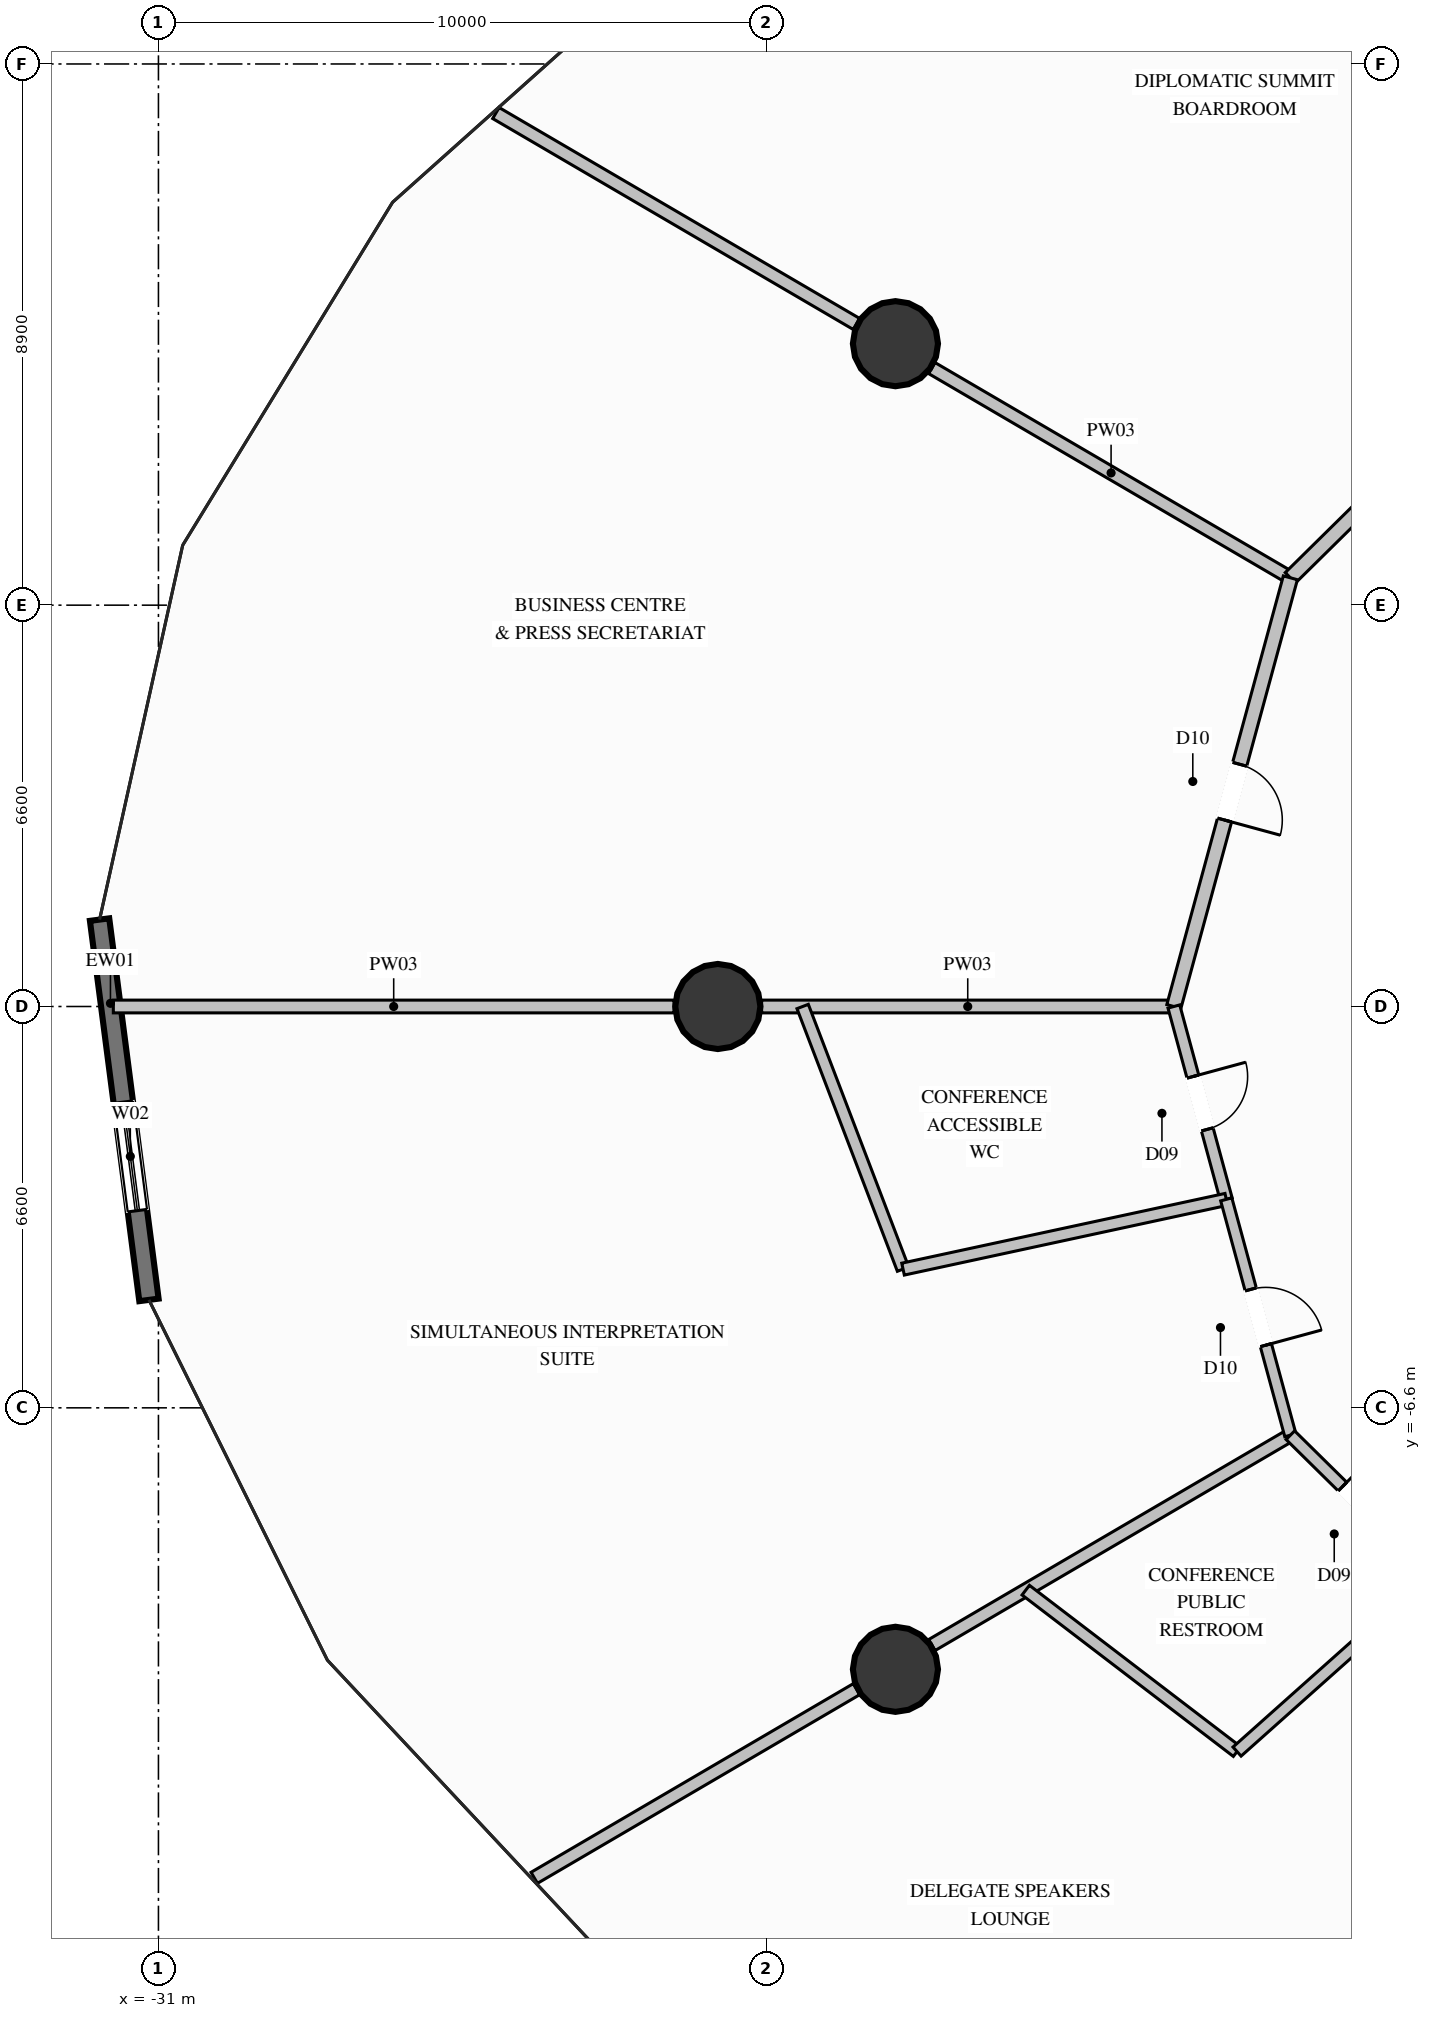
"""IFC4 building model, lengths in metres.
Left out: names, types, materials, properties, quantities, classifications, styles, units other than length and angle.
Written with IfcOpenShell. Run it as: python <this file> out.ifc"""

import sys

from ifc_helpers import new_model, si_unit, direction, frame, frame_2d, origin, origin_2d, place, context, subcontext, project, spatial, rectangle, circle, extrude, element, fill, save


model = new_model("IFC4")
c1 = context("Model", 3, precision=1e-05, world=origin(), true_north=direction((0.0, 1.0)))
c2 = subcontext(c1, "Body", "Model", "MODEL_VIEW")
j1 = project(units=[si_unit("LENGTHUNIT", "METRE"), si_unit("PLANEANGLEUNIT", "RADIAN")], contexts=[c1])
p1 = place(None, origin())
s1 = spatial("IfcSite", under=j1, at=p1, CompositionType="ELEMENT")
p2 = place(p1, origin())
s2 = spatial("IfcBuilding", under=s1, at=p2, CompositionType="ELEMENT")
p3 = place(p2, frame((0.0, 0.0, 18.6)))
s3 = spatial("IfcBuildingStorey", under=s2, at=p3, CompositionType="ELEMENT", Elevation=18.6)
for number, where, z_axis, x_axis in (
    (1, (-18.879, 10.9, 0.0), (0.0, 0.0, 1.0), (1.0, 0.0, 0.0)),
    (2, (-21.8, 0.0, 0.0), (0.0, 0.0, 1.0), (1.0, 0.0, 0.0)),
    (3, (-18.879, -10.9, 0.0), (0.0, 0.0, 1.0), (1.0, 0.0, 0.0)),
):
    element("IfcColumn", number, at=place(p3, frame(where, z_axis=z_axis, x_axis=x_axis)), inside=s3, PredefinedType="COLUMN", context=c2, shape_type="SweptSolid", body=[
        extrude(circle(Radius=0.7, at=origin_2d()), origin(), (0.0, 0.0, 1.0), 5.0),
    ])
p4 = place(p3, frame((-31.156, -4.825, 0.0), z_axis=(0.0, 0.0, 1.0), x_axis=(-0.128759904048, 0.99167579738, 0.0)))
e4 = element("IfcWall", 4, at=p4, inside=s3, PredefinedType="SOLIDWALL", context=c2, shape_type="SweptSolid", body=[
    extrude(rectangle(XDim=6.306, YDim=0.32, at=frame_2d((3.153, 0.0))), origin(), (0.0, 0.0, 1.0), 4.64),
])
p5 = place(p4, frame((1.48, 0.0, 0.65)))
e5 = element("IfcOpeningElement", 5, at=p5, cuts=e4, PredefinedType="OPENING", context=c2, shape_type="SweptSolid", body=[
    extrude(rectangle(XDim=1.8, YDim=2.6, at=frame_2d((0.9, 1.3))), frame((0.0, 0.17, 0.0), z_axis=(0.0, -1.0, 0.0), x_axis=(1.0, 0.0, 0.0)), (0.0, 0.0, 1.0), 0.34),
])
p6 = place(p3, frame((-12.384, 7.05, 0.0), z_axis=(0.0, 0.0, 1.0), x_axis=(-0.863200238908, 0.504861711313, 0.0)))
e6 = element("IfcWall", 6, at=p6, inside=s3, PredefinedType="PARTITIONING", context=c2, shape_type="SweptSolid", body=[
    extrude(rectangle(XDim=6.832, YDim=0.21, at=frame_2d((3.416, 0.0))), origin(), (0.0, 0.0, 1.0), 3.929),
])
p7 = place(p3, frame((-19.521, 11.225, 0.0), z_axis=(0.0, 0.0, 1.0), x_axis=(-0.863178834924, 0.504898305542, 0.0)))
e7 = element("IfcWall", 7, at=p7, inside=s3, PredefinedType="PARTITIONING", context=c2, shape_type="SweptSolid", body=[
    extrude(rectangle(XDim=6.869, YDim=0.21, at=frame_2d((3.434, 0.0))), origin(), (0.0, 0.0, 1.0), 4.64),
])
p8 = place(p3, frame((-14.3, 0.0, 0.0), z_axis=(0.0, 0.0, 1.0), x_axis=(-1.0, 0.0, 0.0)))
e8 = element("IfcWall", 8, at=p8, inside=s3, PredefinedType="PARTITIONING", context=c2, shape_type="SweptSolid", body=[
    extrude(rectangle(XDim=6.78, YDim=0.21, at=frame_2d((3.39, 0.0))), origin(), (0.0, 0.0, 1.0), 3.929),
])
p9 = place(p3, frame((-22.52, 0.0, 0.0), z_axis=(0.0, 0.0, 1.0), x_axis=(-1.0, 0.0, 0.0)))
e9 = element("IfcWall", 9, at=p9, inside=s3, PredefinedType="PARTITIONING", context=c2, shape_type="SweptSolid", body=[
    extrude(rectangle(XDim=9.222, YDim=0.21, at=frame_2d((4.611, 0.0))), origin(), (0.0, 0.0, 1.0), 4.64),
])
p10 = place(p3, frame((-12.384, -7.05, 0.0), z_axis=(0.0, 0.0, 1.0), x_axis=(-0.863039168853, -0.505137004213, 0.0)))
e10 = element("IfcWall", 10, at=p10, inside=s3, PredefinedType="PARTITIONING", context=c2, shape_type="SweptSolid", body=[
    extrude(rectangle(XDim=6.832, YDim=0.21, at=frame_2d((3.416, 0.0))), origin(), (0.0, 0.0, 1.0), 3.929),
])
p11 = place(p3, frame((-19.52, -11.227, 0.0), z_axis=(0.0, 0.0, 1.0), x_axis=(-0.863003476407, -0.505197980706, 0.0)))
e11 = element("IfcWall", 11, at=p11, inside=s3, PredefinedType="PARTITIONING", context=c2, shape_type="SweptSolid", body=[
    extrude(rectangle(XDim=6.14, YDim=0.21, at=frame_2d((3.07, 0.0))), origin(), (0.0, 0.0, 1.0), 4.64),
])
p12 = place(p3, frame((-7.15, 12.211, 0.0), z_axis=(0.0, 0.0, 1.0), x_axis=(-0.712071304345, -0.702107155303, 0.0)))
e12 = element("IfcWall", 12, at=p12, inside=s3, PredefinedType="PARTITIONING", context=c2, shape_type="SweptSolid", body=[
    extrude(rectangle(XDim=7.351, YDim=0.24, at=frame_2d((3.675, 0.0))), origin(), (0.0, 0.0, 1.0), 4.64),
])
p13 = place(p3, frame((-12.384, 7.05, 0.0), z_axis=(0.0, 0.0, 1.0), x_axis=(-0.262260528785, -0.964997106235, 0.0)))
e13 = element("IfcWall", 13, at=p13, inside=s3, PredefinedType="PARTITIONING", context=c2, shape_type="SweptSolid", body=[
    extrude(rectangle(XDim=7.306, YDim=0.24, at=frame_2d((3.653, 0.0))), origin(), (0.0, 0.0, 1.0), 4.64),
])
p14 = place(p13, frame((3.178, 0.0, 0.0)))
e14 = element("IfcOpeningElement", 14, at=p14, cuts=e13, PredefinedType="OPENING", context=c2, shape_type="SweptSolid", body=[
    extrude(rectangle(XDim=0.95, YDim=2.1, at=frame_2d((0.475, 1.05))), frame((0.0, 0.13, 0.0), z_axis=(0.0, -1.0, 0.0), x_axis=(1.0, 0.0, 0.0)), (0.0, 0.0, 1.0), 0.26),
])
p15 = place(p3, frame((-14.3, 0.0, 0.0), z_axis=(0.0, 0.0, 1.0), x_axis=(0.262250045558, -0.964999955236, 0.0)))
e15 = element("IfcWall", 15, at=p15, inside=s3, PredefinedType="PLUMBINGWALL", context=c2, shape_type="SweptSolid", body=[
    extrude(rectangle(XDim=3.287, YDim=0.2, at=frame_2d((1.644, 0.0))), origin(), (0.0, 0.0, 1.0), 4.64),
])
p16 = place(p15, frame((1.194, 0.0, 0.0)))
e16 = element("IfcOpeningElement", 16, at=p16, cuts=e15, PredefinedType="OPENING", context=c2, shape_type="SweptSolid", body=[
    extrude(rectangle(XDim=0.9, YDim=2.1, at=frame_2d((0.45, 1.05))), frame((0.0, 0.11, 0.0), z_axis=(0.0, -1.0, 0.0), x_axis=(1.0, 0.0, 0.0)), (0.0, 0.0, 1.0), 0.22),
])
p17 = place(p3, frame((-20.405, 0.0, 0.0), z_axis=(0.0, 0.0, 1.0), x_axis=(0.357081916748, -0.93407307248, 0.0)))
e17 = element("IfcWall", 17, at=p17, inside=s3, PredefinedType="PLUMBINGWALL", context=c2, shape_type="SweptSolid", body=[
    extrude(rectangle(XDim=4.624, YDim=0.2, at=frame_2d((2.312, 0.0))), origin(), (0.0, 0.0, 1.0), 4.64),
])
p18 = place(p3, frame((-13.438, -3.172, 0.0), z_axis=(0.0, 0.0, 1.0), x_axis=(-0.97750580223, -0.210908526632, 0.0)))
e18 = element("IfcWall", 18, at=p18, inside=s3, PredefinedType="PLUMBINGWALL", context=c2, shape_type="SweptSolid", body=[
    extrude(rectangle(XDim=5.438, YDim=0.2, at=frame_2d((2.719, 0.0))), origin(), (0.0, 0.0, 1.0), 4.64),
])
p19 = place(p3, frame((-13.438, -3.172, 0.0), z_axis=(0.0, 0.0, 1.0), x_axis=(0.262269103922, -0.9649947757, 0.0)))
e19 = element("IfcWall", 19, at=p19, inside=s3, PredefinedType="PARTITIONING", context=c2, shape_type="SweptSolid", body=[
    extrude(rectangle(XDim=4.019, YDim=0.19, at=frame_2d((2.009, 0.0))), origin(), (0.0, 0.0, 1.0), 4.64),
])
p20 = place(p19, frame((1.534, 0.0, 0.0)))
e20 = element("IfcOpeningElement", 20, at=p20, cuts=e19, PredefinedType="OPENING", context=c2, shape_type="SweptSolid", body=[
    extrude(rectangle(XDim=0.95, YDim=2.1, at=frame_2d((0.475, 1.05))), frame((0.0, 0.105, 0.0), z_axis=(0.0, -1.0, 0.0), x_axis=(1.0, 0.0, 0.0)), (0.0, 0.0, 1.0), 0.21),
])
p21 = place(p3, frame((-12.384, -7.05, 0.0), z_axis=(0.0, 0.0, 1.0), x_axis=(0.712072104827, -0.70210634346, 0.0)))
e21 = element("IfcWall", 21, at=p21, inside=s3, PredefinedType="PLUMBINGWALL", context=c2, shape_type="SweptSolid", body=[
    extrude(rectangle(XDim=3.307, YDim=0.2, at=frame_2d((1.654, 0.0))), origin(), (0.0, 0.0, 1.0), 4.64),
])
p22 = place(p21, frame((1.204, 0.0, 0.0)))
e22 = element("IfcOpeningElement", 22, at=p22, cuts=e21, PredefinedType="OPENING", context=c2, shape_type="SweptSolid", body=[
    extrude(rectangle(XDim=0.9, YDim=2.1, at=frame_2d((0.45, 1.05))), frame((0.0, 0.11, 0.0), z_axis=(0.0, -1.0, 0.0), x_axis=(1.0, 0.0, 0.0)), (0.0, 0.0, 1.0), 0.22),
])
p23 = place(p3, frame((-16.736, -9.598, 0.0), z_axis=(0.0, 0.0, 1.0), x_axis=(0.794622380962, -0.607104004002, 0.0)))
e23 = element("IfcWall", 23, at=p23, inside=s3, PredefinedType="PLUMBINGWALL", context=c2, shape_type="SweptSolid", body=[
    extrude(rectangle(XDim=4.373, YDim=0.2, at=frame_2d((2.187, 0.0))), origin(), (0.0, 0.0, 1.0), 4.64),
])
p24 = place(p3, frame((-10.029, -9.372, 0.0), z_axis=(0.0, 0.0, 1.0), x_axis=(-0.746487697468, -0.665399216658, 0.0)))
e24 = element("IfcWall", 24, at=p24, inside=s3, PredefinedType="PLUMBINGWALL", context=c2, shape_type="SweptSolid", body=[
    extrude(rectangle(XDim=4.33, YDim=0.2, at=frame_2d((2.165, 0.0))), origin(), (0.0, 0.0, 1.0), 4.64),
])
p25 = place(p5, origin())
e25 = element("IfcWindow", 25, at=p25, inside=s3, PartitioningType="SINGLE_PANEL", PredefinedType="WINDOW", context=c2, shape_type="SweptSolid", body=[
    extrude(rectangle(XDim=1.8, YDim=2.6, at=frame_2d((0.9, 1.3))), frame((0.0, 0.03, 0.0), z_axis=(0.0, -1.0, 0.0), x_axis=(1.0, 0.0, 0.0)), (0.0, 0.0, 1.0), 0.06),
])
fill(e5, e25)
p26 = place(p14, origin())
e26 = element("IfcDoor", 26, at=p26, inside=s3, OperationType="SINGLE_SWING_RIGHT", PredefinedType="DOOR", context=c2, shape_type="SweptSolid", body=[
    extrude(rectangle(XDim=0.95, YDim=2.1, at=frame_2d((0.475, 1.05))), frame((0.0, 0.025, 0.0), z_axis=(0.0, -1.0, 0.0), x_axis=(1.0, 0.0, 0.0)), (0.0, 0.0, 1.0), 0.05),
])
fill(e14, e26)
p27 = place(p16, origin())
e27 = element("IfcDoor", 27, at=p27, inside=s3, OperationType="SINGLE_SWING_LEFT", PredefinedType="DOOR", context=c2, shape_type="SweptSolid", body=[
    extrude(rectangle(XDim=0.9, YDim=2.1, at=frame_2d((0.45, 1.05))), frame((0.0, 0.025, 0.0), z_axis=(0.0, -1.0, 0.0), x_axis=(1.0, 0.0, 0.0)), (0.0, 0.0, 1.0), 0.05),
])
fill(e16, e27)
p28 = place(p20, origin())
e28 = element("IfcDoor", 28, at=p28, inside=s3, OperationType="SINGLE_SWING_RIGHT", PredefinedType="DOOR", context=c2, shape_type="SweptSolid", body=[
    extrude(rectangle(XDim=0.95, YDim=2.1, at=frame_2d((0.475, 1.05))), frame((0.0, 0.025, 0.0), z_axis=(0.0, -1.0, 0.0), x_axis=(1.0, 0.0, 0.0)), (0.0, 0.0, 1.0), 0.05),
])
fill(e20, e28)
p29 = place(p22, origin())
e29 = element("IfcDoor", 29, at=p29, inside=s3, OperationType="SINGLE_SWING_LEFT", PredefinedType="DOOR", context=c2, shape_type="SweptSolid", body=[
    extrude(rectangle(XDim=0.9, YDim=2.1, at=frame_2d((0.45, 1.05))), frame((0.0, 0.025, 0.0), z_axis=(0.0, -1.0, 0.0), x_axis=(1.0, 0.0, 0.0)), (0.0, 0.0, 1.0), 0.05),
])
fill(e22, e29)
save(model, sys.argv[1])
